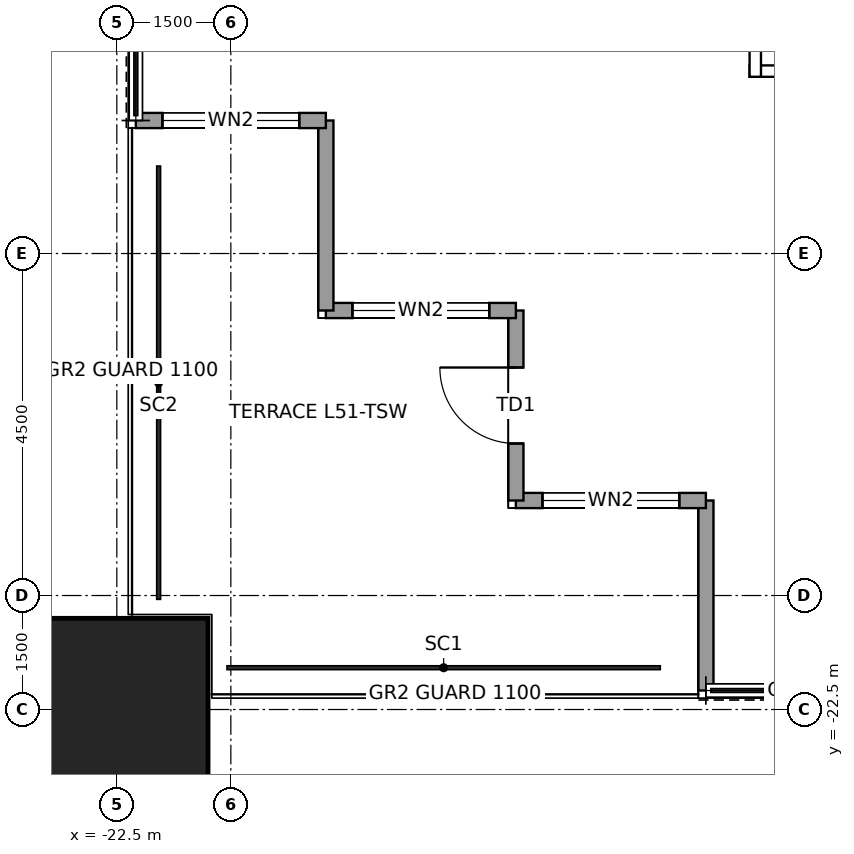
"""IFC4 building model, lengths in metres.
Left out: names, types, materials, properties, quantities, classifications, styles, units other than length and angle.
Written with IfcOpenShell. Run it as: python <this file> out.ifc"""

import sys

from ifc_helpers import new_model, si_unit, direction, frame, frame_2d, origin, origin_2d, place, context, subcontext, project, spatial, rectangle, hollow_rectangle, extrude, element, fill, save


model = new_model("IFC4")
c1 = context("Model", 3, precision=1e-05, world=origin(), true_north=direction((0.0, 1.0)))
c2 = subcontext(c1, "Body", "Model", "MODEL_VIEW")
j1 = project(units=[si_unit("LENGTHUNIT", "METRE"), si_unit("PLANEANGLEUNIT", "RADIAN")], contexts=[c1])
p1 = place(None, origin())
s1 = spatial("IfcSite", under=j1, at=p1, CompositionType="ELEMENT")
p2 = place(p1, origin())
s2 = spatial("IfcBuilding", under=s1, at=p2, CompositionType="ELEMENT")
p3 = place(p2, frame((0.0, 0.0, 237.9)))
s3 = spatial("IfcBuildingStorey", under=s2, at=p3, CompositionType="ELEMENT", Elevation=237.9)
p4 = place(p3, frame((-22.5, -22.5, 0.0), z_axis=(0.0, 0.0, 1.0), x_axis=(1.0, 0.0, 0.0)))
e1 = element("IfcColumn", 1, at=p4, inside=s3, PredefinedType="COLUMN", context=c2, shape_type="SweptSolid", body=[
    extrude(hollow_rectangle(XDim=2.4, YDim=2.4, WallThickness=0.12, at=origin_2d()), origin(), (0.0, 0.0, 1.0), 4.0),
])
p5 = place(p3, frame((-14.75, -22.25, 0.0), z_axis=(0.0, 0.0, 1.0), x_axis=(0.0, 1.0, 0.0)))
e2 = element("IfcWall", 2, at=p5, inside=s3, PredefinedType="SOLIDWALL", context=c2, shape_type="SweptSolid", body=[
    extrude(rectangle(XDim=2.5, YDim=0.2, at=frame_2d((1.25, 0.0))), origin(), (0.0, 0.0, 1.0), 3.85),
])
p6 = place(p3, frame((-14.75, -19.75, 0.0), z_axis=(0.0, 0.0, 1.0), x_axis=(-1.0, 0.0, 0.0)))
e3 = element("IfcWall", 3, at=p6, inside=s3, PredefinedType="SOLIDWALL", context=c2, shape_type="SweptSolid", body=[
    extrude(rectangle(XDim=2.5, YDim=0.2, at=frame_2d((1.25, 0.0))), origin(), (0.0, 0.0, 1.0), 3.85),
])
p7 = place(p6, frame((0.35, 0.0, 0.3)))
e4 = element("IfcOpeningElement", 4, at=p7, cuts=e3, PredefinedType="OPENING", context=c2, shape_type="SweptSolid", body=[
    extrude(rectangle(XDim=1.8, YDim=2.4, at=frame_2d((0.9, 1.2))), frame((0.0, 0.11, 0.0), z_axis=(0.0, -1.0, 0.0), x_axis=(1.0, 0.0, 0.0)), (0.0, 0.0, 1.0), 0.22),
])
p8 = place(p3, frame((-17.25, -19.75, 0.0), z_axis=(0.0, 0.0, 1.0), x_axis=(0.0, 1.0, 0.0)))
e5 = element("IfcWall", 5, at=p8, inside=s3, PredefinedType="SOLIDWALL", context=c2, shape_type="SweptSolid", body=[
    extrude(rectangle(XDim=2.5, YDim=0.2, at=frame_2d((1.25, 0.0))), origin(), (0.0, 0.0, 1.0), 3.85),
])
p9 = place(p8, frame((0.75, 0.0, 0.0)))
e6 = element("IfcOpeningElement", 6, at=p9, cuts=e5, PredefinedType="OPENING", context=c2, shape_type="SweptSolid", body=[
    extrude(rectangle(XDim=1.0, YDim=2.4, at=frame_2d((0.5, 1.2))), frame((0.0, 0.11, 0.0), z_axis=(0.0, -1.0, 0.0), x_axis=(1.0, 0.0, 0.0)), (0.0, 0.0, 1.0), 0.22),
])
p10 = place(p3, frame((-17.25, -17.25, 0.0), z_axis=(0.0, 0.0, 1.0), x_axis=(-1.0, 0.0, 0.0)))
e7 = element("IfcWall", 7, at=p10, inside=s3, PredefinedType="SOLIDWALL", context=c2, shape_type="SweptSolid", body=[
    extrude(rectangle(XDim=2.5, YDim=0.2, at=frame_2d((1.25, 0.0))), origin(), (0.0, 0.0, 1.0), 3.85),
])
p11 = place(p10, frame((0.35, 0.0, 0.3)))
e8 = element("IfcOpeningElement", 8, at=p11, cuts=e7, PredefinedType="OPENING", context=c2, shape_type="SweptSolid", body=[
    extrude(rectangle(XDim=1.8, YDim=2.4, at=frame_2d((0.9, 1.2))), frame((0.0, 0.11, 0.0), z_axis=(0.0, -1.0, 0.0), x_axis=(1.0, 0.0, 0.0)), (0.0, 0.0, 1.0), 0.22),
])
p12 = place(p3, frame((-19.75, -17.25, 0.0), z_axis=(0.0, 0.0, 1.0), x_axis=(0.0, 1.0, 0.0)))
e9 = element("IfcWall", 9, at=p12, inside=s3, PredefinedType="SOLIDWALL", context=c2, shape_type="SweptSolid", body=[
    extrude(rectangle(XDim=2.5, YDim=0.2, at=frame_2d((1.25, 0.0))), origin(), (0.0, 0.0, 1.0), 3.85),
])
p13 = place(p3, frame((-19.75, -14.75, 0.0), z_axis=(0.0, 0.0, 1.0), x_axis=(-1.0, 0.0, 0.0)))
e10 = element("IfcWall", 10, at=p13, inside=s3, PredefinedType="SOLIDWALL", context=c2, shape_type="SweptSolid", body=[
    extrude(rectangle(XDim=2.5, YDim=0.2, at=frame_2d((1.25, 0.0))), origin(), (0.0, 0.0, 1.0), 3.85),
])
p14 = place(p13, frame((0.35, 0.0, 0.3)))
e11 = element("IfcOpeningElement", 11, at=p14, cuts=e10, PredefinedType="OPENING", context=c2, shape_type="SweptSolid", body=[
    extrude(rectangle(XDim=1.8, YDim=2.4, at=frame_2d((0.9, 1.2))), frame((0.0, 0.11, 0.0), z_axis=(0.0, -1.0, 0.0), x_axis=(1.0, 0.0, 0.0)), (0.0, 0.0, 1.0), 0.22),
])
p15 = place(p3, frame((-14.175, -14.1, 0.0), z_axis=(0.0, 0.0, 1.0), x_axis=(1.0, 0.0, 0.0)))
e12 = element("IfcWall", 12, at=p15, inside=s3, PredefinedType="PARTITIONING", context=c2, shape_type="SweptSolid", body=[
    extrude(rectangle(XDim=4.333, YDim=0.15, at=frame_2d((2.167, 0.0))), origin(), (0.0, 0.0, 1.0), 3.85),
])
p16 = place(p3, frame((-14.1, -14.175, 0.0), z_axis=(0.0, 0.0, 1.0), x_axis=(0.0, 1.0, 0.0)))
e13 = element("IfcWall", 13, at=p16, inside=s3, PredefinedType="PARTITIONING", context=c2, shape_type="SweptSolid", body=[
    extrude(rectangle(XDim=26.25, YDim=0.15, at=frame_2d((13.125, 0.0))), origin(), (0.0, 0.0, 1.0), 3.85),
])
p17 = place(p16, frame((4.125, 0.0, 0.0)))
e14 = element("IfcOpeningElement", 14, at=p17, cuts=e13, PredefinedType="OPENING", context=c2, shape_type="SweptSolid", body=[
    extrude(rectangle(XDim=1.0, YDim=2.4, at=frame_2d((0.5, 1.2))), frame((0.0, 0.085, 0.0), z_axis=(0.0, -1.0, 0.0), x_axis=(1.0, 0.0, 0.0)), (0.0, 0.0, 1.0), 0.17),
])
p18 = place(p7, origin())
e15 = element("IfcWindow", 15, at=p18, inside=s3, PartitioningType="SINGLE_PANEL", PredefinedType="WINDOW", context=c2, shape_type="SweptSolid", body=[
    extrude(rectangle(XDim=1.8, YDim=2.4, at=frame_2d((0.9, 1.2))), frame((0.0, 0.03, 0.0), z_axis=(0.0, -1.0, 0.0), x_axis=(1.0, 0.0, 0.0)), (0.0, 0.0, 1.0), 0.06),
])
fill(e4, e15)
p19 = place(p9, origin())
e16 = element("IfcDoor", 16, at=p19, inside=s3, OperationType="SINGLE_SWING_RIGHT", PredefinedType="DOOR", context=c2, shape_type="SweptSolid", body=[
    extrude(rectangle(XDim=1.0, YDim=2.4, at=frame_2d((0.5, 1.2))), frame((0.0, 0.025, 0.0), z_axis=(0.0, -1.0, 0.0), x_axis=(1.0, 0.0, 0.0)), (0.0, 0.0, 1.0), 0.05),
])
fill(e6, e16)
p20 = place(p11, origin())
e17 = element("IfcWindow", 17, at=p20, inside=s3, PartitioningType="SINGLE_PANEL", PredefinedType="WINDOW", context=c2, shape_type="SweptSolid", body=[
    extrude(rectangle(XDim=1.8, YDim=2.4, at=frame_2d((0.9, 1.2))), frame((0.0, 0.03, 0.0), z_axis=(0.0, -1.0, 0.0), x_axis=(1.0, 0.0, 0.0)), (0.0, 0.0, 1.0), 0.06),
])
fill(e8, e17)
p21 = place(p14, origin())
e18 = element("IfcWindow", 18, at=p21, inside=s3, PartitioningType="SINGLE_PANEL", PredefinedType="WINDOW", context=c2, shape_type="SweptSolid", body=[
    extrude(rectangle(XDim=1.8, YDim=2.4, at=frame_2d((0.9, 1.2))), frame((0.0, 0.03, 0.0), z_axis=(0.0, -1.0, 0.0), x_axis=(1.0, 0.0, 0.0)), (0.0, 0.0, 1.0), 0.06),
])
fill(e11, e18)
save(model, sys.argv[1])
